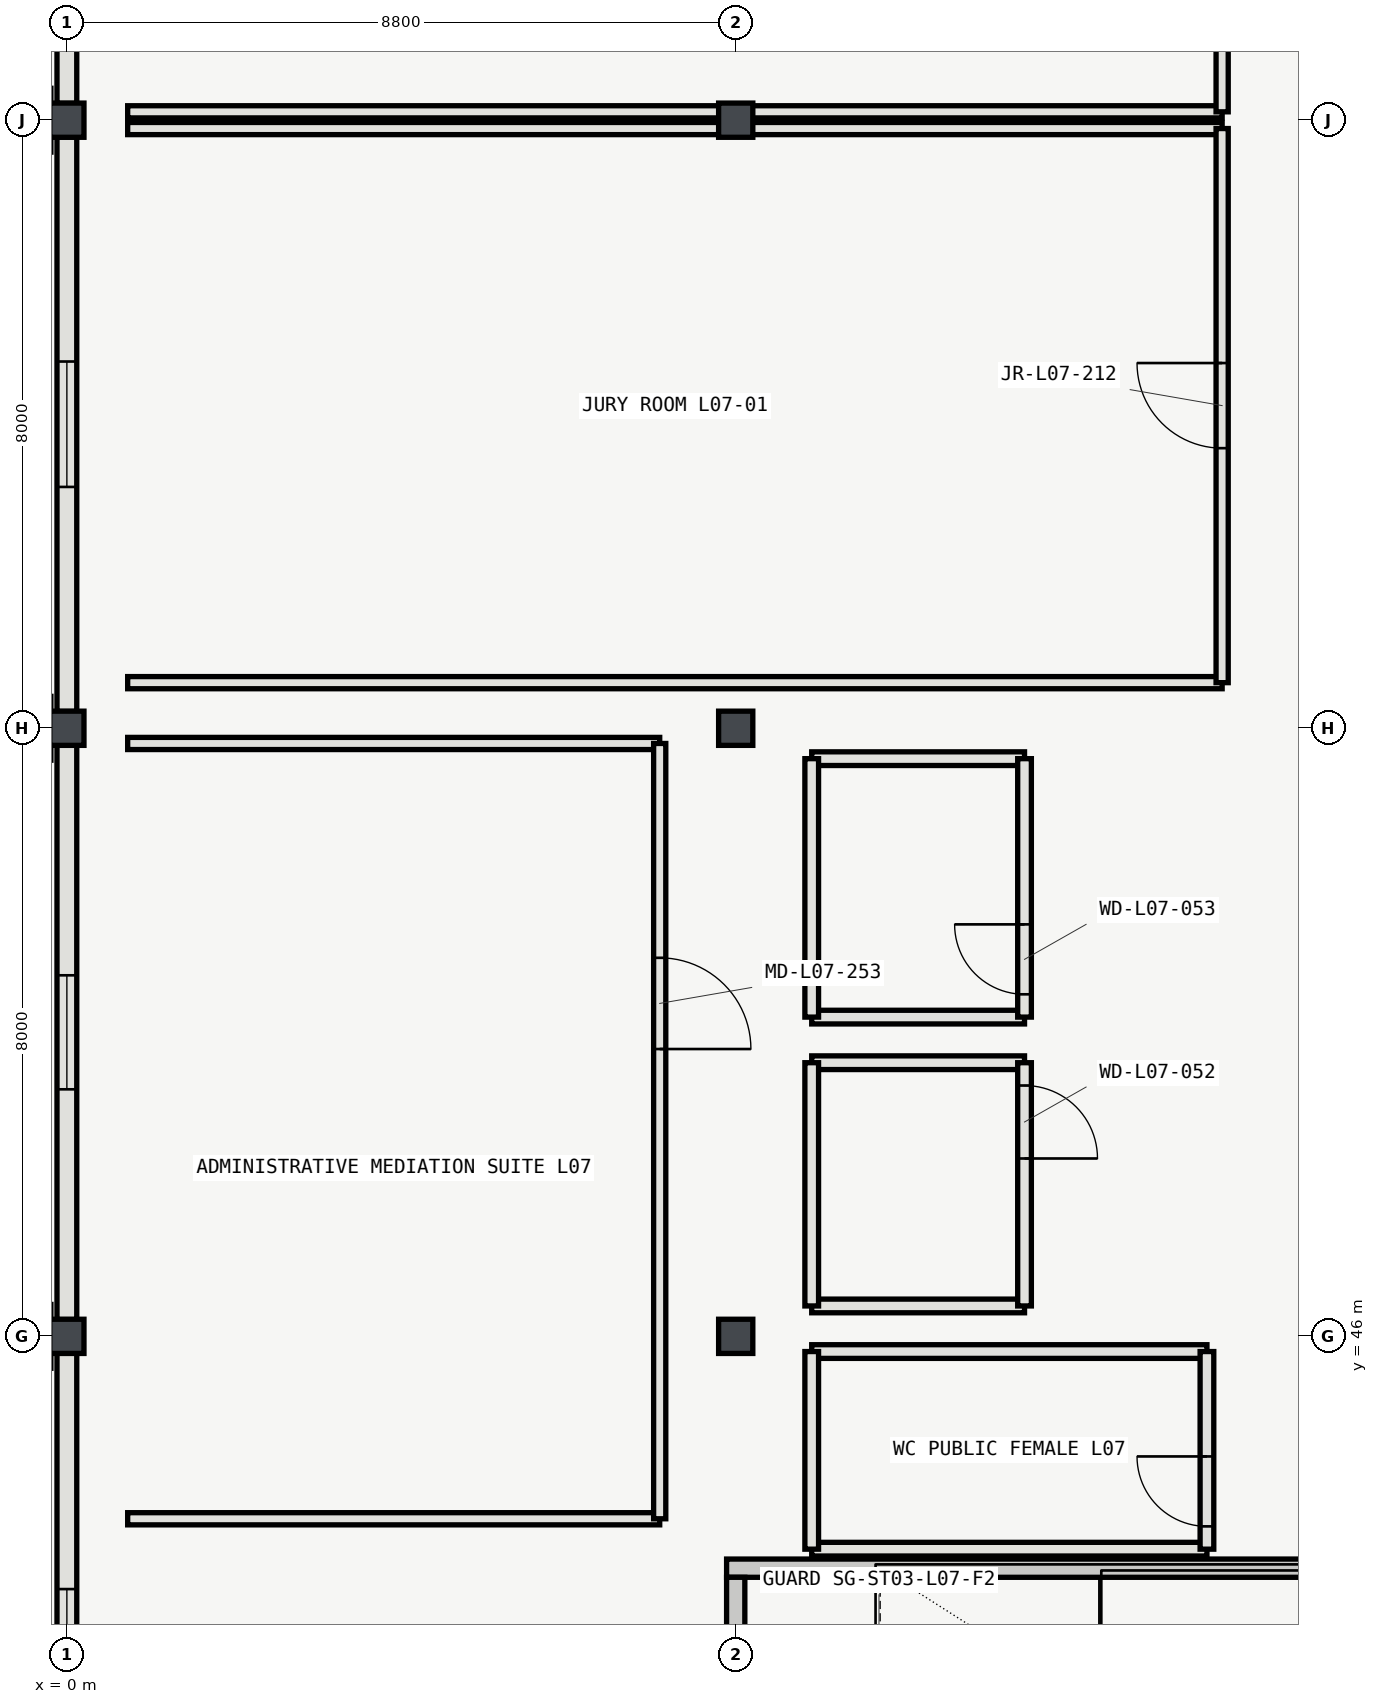
"""IFC4 building model, lengths in metres.
Left out: names, types, materials, properties, quantities, classifications, styles, units other than length and angle.
Written with IfcOpenShell. Run it as: python <this file> out.ifc"""

import sys

from ifc_helpers import new_model, si_unit, direction, frame, frame_2d, origin, origin_2d, place, context, subcontext, project, spatial, rectangle, hollow_rectangle, extrude, element, fill, save


model = new_model("IFC4")
c1 = context("Model", 3, precision=1e-05, world=origin(), true_north=direction((0.0, 1.0)))
c2 = subcontext(c1, "Body", "Model", "MODEL_VIEW")
j1 = project(units=[si_unit("LENGTHUNIT", "METRE"), si_unit("PLANEANGLEUNIT", "RADIAN")], contexts=[c1])
p1 = place(None, origin())
s1 = spatial("IfcSite", under=j1, at=p1, CompositionType="ELEMENT")
p2 = place(p1, origin())
s2 = spatial("IfcBuilding", under=s1, at=p2, CompositionType="ELEMENT")
p3 = place(p2, frame((0.0, 0.0, 33.0)))
s3 = spatial("IfcBuildingStorey", under=s2, at=p3, CompositionType="ELEMENT", Elevation=33.0)
for number, where, z_axis, x_axis in (
    (1, (0.0, 46.0, 0.0), (0.0, 0.0, 1.0), (1.0, 0.0, 0.0)),
    (2, (0.0, 54.0, 0.0), (0.0, 0.0, 1.0), (1.0, 0.0, 0.0)),
    (3, (0.0, 62.0, 0.0), (0.0, 0.0, 1.0), (1.0, 0.0, 0.0)),
    (4, (8.8, 46.0, 0.0), (0.0, 0.0, 1.0), (1.0, 0.0, 0.0)),
    (5, (8.8, 54.0, 0.0), (0.0, 0.0, 1.0), (1.0, 0.0, 0.0)),
    (6, (8.8, 62.0, 0.0), (0.0, 0.0, 1.0), (1.0, 0.0, 0.0)),
):
    element("IfcColumn", number, at=place(p3, frame(where, z_axis=z_axis, x_axis=x_axis)), inside=s3, PredefinedType="COLUMN", context=c2, shape_type="SweptSolid", body=[
        extrude(hollow_rectangle(XDim=0.45, YDim=0.45, WallThickness=0.018, InnerFilletRadius=0.018, OuterFilletRadius=0.036, at=origin_2d()), origin(), (0.0, 0.0, 1.0), 4.2),
    ])
p4 = place(p3, frame((0.0, 45.779, 0.0), z_axis=(0.0, 0.0, 1.0), x_axis=(0.0, -1.0, 0.0)))
e7 = element("IfcWall", 7, at=p4, inside=s3, PredefinedType="SOLIDWALL", context=c2, shape_type="SweptSolid", body=[
    extrude(rectangle(XDim=7.558, YDim=0.26, at=frame_2d((3.779, 0.0))), origin(), (0.0, 0.0, 1.0), 3.483),
])
p5 = place(p4, frame((3.104, 0.0, 0.95)))
e8 = element("IfcOpeningElement", 8, at=p5, cuts=e7, PredefinedType="OPENING", context=c2, shape_type="SweptSolid", body=[
    extrude(rectangle(XDim=1.35, YDim=2.1, at=frame_2d((0.675, 1.05))), frame((0.0, 0.14, 0.0), z_axis=(0.0, -1.0, 0.0), x_axis=(1.0, 0.0, 0.0)), (0.0, 0.0, 1.0), 0.28),
])
p6 = place(p3, frame((0.0, 53.779, 0.0), z_axis=(0.0, 0.0, 1.0), x_axis=(0.0, -1.0, 0.0)))
e9 = element("IfcWall", 9, at=p6, inside=s3, PredefinedType="SOLIDWALL", context=c2, shape_type="SweptSolid", body=[
    extrude(rectangle(XDim=7.558, YDim=0.26, at=frame_2d((3.779, 0.0))), origin(), (0.0, 0.0, 1.0), 3.483),
])
p7 = place(p6, frame((3.029, 0.0, 0.95)))
e10 = element("IfcOpeningElement", 10, at=p7, cuts=e9, PredefinedType="OPENING", context=c2, shape_type="SweptSolid", body=[
    extrude(rectangle(XDim=1.5, YDim=2.1, at=frame_2d((0.75, 1.05))), frame((0.0, 0.14, 0.0), z_axis=(0.0, -1.0, 0.0), x_axis=(1.0, 0.0, 0.0)), (0.0, 0.0, 1.0), 0.28),
])
p8 = place(p3, frame((0.0, 61.779, 0.0), z_axis=(0.0, 0.0, 1.0), x_axis=(0.0, -1.0, 0.0)))
e11 = element("IfcWall", 11, at=p8, inside=s3, PredefinedType="SOLIDWALL", context=c2, shape_type="SweptSolid", body=[
    extrude(rectangle(XDim=7.558, YDim=0.26, at=frame_2d((3.779, 0.0))), origin(), (0.0, 0.0, 1.0), 3.483),
])
p9 = place(p8, frame((2.954, 0.0, 0.95)))
e12 = element("IfcOpeningElement", 12, at=p9, cuts=e11, PredefinedType="OPENING", context=c2, shape_type="SweptSolid", body=[
    extrude(rectangle(XDim=1.65, YDim=2.1, at=frame_2d((0.825, 1.05))), frame((0.0, 0.14, 0.0), z_axis=(0.0, -1.0, 0.0), x_axis=(1.0, 0.0, 0.0)), (0.0, 0.0, 1.0), 0.28),
])
p10 = place(p3, frame((0.0, 69.779, 0.0), z_axis=(0.0, 0.0, 1.0), x_axis=(0.0, -1.0, 0.0)))
e13 = element("IfcWall", 13, at=p10, inside=s3, PredefinedType="SOLIDWALL", context=c2, shape_type="SweptSolid", body=[
    extrude(rectangle(XDim=7.558, YDim=0.26, at=frame_2d((3.779, 0.0))), origin(), (0.0, 0.0, 1.0), 3.483),
])
p11 = place(p10, frame((2.879, 0.0, 0.95)))
e14 = element("IfcOpeningElement", 14, at=p11, cuts=e13, PredefinedType="OPENING", context=c2, shape_type="SweptSolid", body=[
    extrude(rectangle(XDim=1.8, YDim=2.1, at=frame_2d((0.9, 1.05))), frame((0.0, 0.14, 0.0), z_axis=(0.0, -1.0, 0.0), x_axis=(1.0, 0.0, 0.0)), (0.0, 0.0, 1.0), 0.28),
])
for number, where, z_axis, x_axis in (
    (15, (9.8, 46.4, 0.0), (0.0, 0.0, 1.0), (1.0, 0.0, 0.0)),
    (16, (12.6, 49.6, 0.0), (0.0, 0.0, 1.0), (-1.0, 0.0, 0.0)),
):
    element("IfcWall", number, at=place(p3, frame(where, z_axis=z_axis, x_axis=x_axis)), inside=s3, PredefinedType="PLUMBINGWALL", context=c2, shape_type="SweptSolid", body=[
        extrude(rectangle(XDim=2.8, YDim=0.18, at=frame_2d((1.4, 0.0))), origin(), (0.0, 0.0, 1.0), 3.92),
    ])
p12 = place(p3, frame((9.8, 49.6, 0.0), z_axis=(0.0, 0.0, 1.0), x_axis=(0.0, -1.0, 0.0)))
e17 = element("IfcWall", 17, at=p12, inside=s3, PredefinedType="PLUMBINGWALL", context=c2, shape_type="SweptSolid", body=[
    extrude(rectangle(XDim=3.2, YDim=0.18, at=frame_2d((1.6, 0.0))), origin(), (0.0, 0.0, 1.0), 3.92),
])
p13 = place(p3, frame((12.6, 46.4, 0.0), z_axis=(0.0, 0.0, 1.0), x_axis=(0.0, 1.0, 0.0)))
e18 = element("IfcWall", 18, at=p13, inside=s3, PredefinedType="PLUMBINGWALL", context=c2, shape_type="SweptSolid", body=[
    extrude(rectangle(XDim=3.2, YDim=0.18, at=frame_2d((1.6, 0.0))), origin(), (0.0, 0.0, 1.0), 3.92),
])
p14 = place(p13, frame((1.94, 0.0, 0.0)))
e19 = element("IfcOpeningElement", 19, at=p14, cuts=e18, PredefinedType="OPENING", context=c2, shape_type="SweptSolid", body=[
    extrude(rectangle(XDim=0.96, YDim=2.1, at=frame_2d((0.48, 1.05))), frame((0.0, 0.1, 0.0), z_axis=(0.0, -1.0, 0.0), x_axis=(1.0, 0.0, 0.0)), (0.0, 0.0, 1.0), 0.2),
])
for number, where, z_axis, x_axis in (
    (20, (9.8, 50.2, 0.0), (0.0, 0.0, 1.0), (1.0, 0.0, 0.0)),
    (21, (12.6, 53.6, 0.0), (0.0, 0.0, 1.0), (-1.0, 0.0, 0.0)),
):
    element("IfcWall", number, at=place(p3, frame(where, z_axis=z_axis, x_axis=x_axis)), inside=s3, PredefinedType="PLUMBINGWALL", context=c2, shape_type="SweptSolid", body=[
        extrude(rectangle(XDim=2.8, YDim=0.18, at=frame_2d((1.4, 0.0))), origin(), (0.0, 0.0, 1.0), 3.92),
    ])
p15 = place(p3, frame((9.8, 53.6, 0.0), z_axis=(0.0, 0.0, 1.0), x_axis=(0.0, -1.0, 0.0)))
e22 = element("IfcWall", 22, at=p15, inside=s3, PredefinedType="PLUMBINGWALL", context=c2, shape_type="SweptSolid", body=[
    extrude(rectangle(XDim=3.4, YDim=0.18, at=frame_2d((1.7, 0.0))), origin(), (0.0, 0.0, 1.0), 3.92),
])
p16 = place(p3, frame((12.6, 50.2, 0.0), z_axis=(0.0, 0.0, 1.0), x_axis=(0.0, 1.0, 0.0)))
e23 = element("IfcWall", 23, at=p16, inside=s3, PredefinedType="PLUMBINGWALL", context=c2, shape_type="SweptSolid", body=[
    extrude(rectangle(XDim=3.4, YDim=0.18, at=frame_2d((1.7, 0.0))), origin(), (0.0, 0.0, 1.0), 3.92),
])
p17 = place(p16, frame((0.3, 0.0, 0.0)))
e24 = element("IfcOpeningElement", 24, at=p17, cuts=e23, PredefinedType="OPENING", context=c2, shape_type="SweptSolid", body=[
    extrude(rectangle(XDim=0.92, YDim=2.1, at=frame_2d((0.46, 1.05))), frame((0.0, 0.1, 0.0), z_axis=(0.0, -1.0, 0.0), x_axis=(1.0, 0.0, 0.0)), (0.0, 0.0, 1.0), 0.2),
])
p18 = place(p3, frame((9.8, 43.2, 0.0), z_axis=(0.0, 0.0, 1.0), x_axis=(1.0, 0.0, 0.0)))
e25 = element("IfcWall", 25, at=p18, inside=s3, PredefinedType="PLUMBINGWALL", context=c2, shape_type="SweptSolid", body=[
    extrude(rectangle(XDim=5.2, YDim=0.18, at=frame_2d((2.6, 0.0))), origin(), (0.0, 0.0, 1.0), 3.92),
])
p19 = place(p3, frame((15.0, 45.8, 0.0), z_axis=(0.0, 0.0, 1.0), x_axis=(-1.0, 0.0, 0.0)))
e26 = element("IfcWall", 26, at=p19, inside=s3, PredefinedType="PLUMBINGWALL", context=c2, shape_type="SweptSolid", body=[
    extrude(rectangle(XDim=5.2, YDim=0.18, at=frame_2d((2.6, 0.0))), origin(), (0.0, 0.0, 1.0), 3.636),
])
p20 = place(p3, frame((9.8, 45.8, 0.0), z_axis=(0.0, 0.0, 1.0), x_axis=(0.0, -1.0, 0.0)))
e27 = element("IfcWall", 27, at=p20, inside=s3, PredefinedType="PLUMBINGWALL", context=c2, shape_type="SweptSolid", body=[
    extrude(rectangle(XDim=2.6, YDim=0.18, at=frame_2d((1.3, 0.0))), origin(), (0.0, 0.0, 1.0), 3.92),
])
p21 = place(p3, frame((15.0, 43.2, 0.0), z_axis=(0.0, 0.0, 1.0), x_axis=(0.0, 1.0, 0.0)))
e28 = element("IfcWall", 28, at=p21, inside=s3, PredefinedType="PLUMBINGWALL", context=c2, shape_type="SweptSolid", body=[
    extrude(rectangle(XDim=2.6, YDim=0.18, at=frame_2d((1.3, 0.0))), origin(), (0.0, 0.0, 1.0), 3.92),
])
p22 = place(p21, frame((0.3, 0.0, 0.0)))
e29 = element("IfcOpeningElement", 29, at=p22, cuts=e28, PredefinedType="OPENING", context=c2, shape_type="SweptSolid", body=[
    extrude(rectangle(XDim=0.92, YDim=2.1, at=frame_2d((0.46, 1.05))), frame((0.0, 0.1, 0.0), z_axis=(0.0, -1.0, 0.0), x_axis=(1.0, 0.0, 0.0)), (0.0, 0.0, 1.0), 0.2),
])
p23 = place(p3, frame((0.8, 54.6, 0.0), z_axis=(0.0, 0.0, 1.0), x_axis=(1.0, 0.0, 0.0)))
e30 = element("IfcWall", 30, at=p23, inside=s3, PredefinedType="PARTITIONING", context=c2, shape_type="SweptSolid", body=[
    extrude(rectangle(XDim=14.4, YDim=0.16, at=frame_2d((7.2, 0.0))), origin(), (0.0, 0.0, 1.0), 3.92),
])
p24 = place(p3, frame((15.2, 61.89, 0.0), z_axis=(0.0, 0.0, 1.0), x_axis=(-1.0, 0.0, 0.0)))
e31 = element("IfcWall", 31, at=p24, inside=s3, PredefinedType="PARTITIONING", context=c2, shape_type="SweptSolid", body=[
    extrude(rectangle(XDim=14.4, YDim=0.16, at=frame_2d((7.2, 0.0))), origin(), (0.0, 0.0, 1.0), 3.636),
])
p25 = place(p3, frame((15.2, 54.6, 0.0), z_axis=(0.0, 0.0, 1.0), x_axis=(0.0, 1.0, 0.0)))
e32 = element("IfcWall", 32, at=p25, inside=s3, PredefinedType="PARTITIONING", context=c2, shape_type="SweptSolid", body=[
    extrude(rectangle(XDim=7.29, YDim=0.16, at=frame_2d((3.645, 0.0))), origin(), (0.0, 0.0, 1.0), 3.92),
])
p26 = place(p25, frame((3.085, 0.0, 0.0)))
e33 = element("IfcOpeningElement", 33, at=p26, cuts=e32, PredefinedType="OPENING", context=c2, shape_type="SweptSolid", body=[
    extrude(rectangle(XDim=1.12, YDim=2.2, at=frame_2d((0.56, 1.1))), frame((0.0, 0.09, 0.0), z_axis=(0.0, -1.0, 0.0), x_axis=(1.0, 0.0, 0.0)), (0.0, 0.0, 1.0), 0.18),
])
p27 = place(p3, frame((0.8, 62.11, 0.0), z_axis=(0.0, 0.0, 1.0), x_axis=(1.0, 0.0, 0.0)))
e34 = element("IfcWall", 34, at=p27, inside=s3, PredefinedType="PARTITIONING", context=c2, shape_type="SweptSolid", body=[
    extrude(rectangle(XDim=14.4, YDim=0.16, at=frame_2d((7.2, 0.0))), origin(), (0.0, 0.0, 1.0), 3.636),
])
p28 = place(p3, frame((15.2, 62.11, 0.0), z_axis=(0.0, 0.0, 1.0), x_axis=(0.0, 1.0, 0.0)))
e35 = element("IfcWall", 35, at=p28, inside=s3, PredefinedType="PARTITIONING", context=c2, shape_type="SweptSolid", body=[
    extrude(rectangle(XDim=7.29, YDim=0.16, at=frame_2d((3.645, 0.0))), origin(), (0.0, 0.0, 1.0), 3.92),
])
p29 = place(p28, frame((3.07, 0.0, 0.0)))
e36 = element("IfcOpeningElement", 36, at=p29, cuts=e35, PredefinedType="OPENING", context=c2, shape_type="SweptSolid", body=[
    extrude(rectangle(XDim=1.15, YDim=2.2, at=frame_2d((0.575, 1.1))), frame((0.0, 0.09, 0.0), z_axis=(0.0, -1.0, 0.0), x_axis=(1.0, 0.0, 0.0)), (0.0, 0.0, 1.0), 0.18),
])
p30 = place(p3, frame((0.8, 43.6, 0.0), z_axis=(0.0, 0.0, 1.0), x_axis=(1.0, 0.0, 0.0)))
e37 = element("IfcWall", 37, at=p30, inside=s3, PredefinedType="PARTITIONING", context=c2, shape_type="SweptSolid", body=[
    extrude(rectangle(XDim=7.0, YDim=0.16, at=frame_2d((3.5, 0.0))), origin(), (0.0, 0.0, 1.0), 3.92),
])
p31 = place(p3, frame((7.8, 53.8, 0.0), z_axis=(0.0, 0.0, 1.0), x_axis=(-1.0, 0.0, 0.0)))
e38 = element("IfcWall", 38, at=p31, inside=s3, PredefinedType="PARTITIONING", context=c2, shape_type="SweptSolid", body=[
    extrude(rectangle(XDim=7.0, YDim=0.16, at=frame_2d((3.5, 0.0))), origin(), (0.0, 0.0, 1.0), 3.486),
])
p32 = place(p3, frame((7.8, 43.6, 0.0), z_axis=(0.0, 0.0, 1.0), x_axis=(0.0, 1.0, 0.0)))
e39 = element("IfcWall", 39, at=p32, inside=s3, PredefinedType="PARTITIONING", context=c2, shape_type="SweptSolid", body=[
    extrude(rectangle(XDim=10.2, YDim=0.16, at=frame_2d((5.1, 0.0))), origin(), (0.0, 0.0, 1.0), 3.92),
])
p33 = place(p32, frame((6.18, 0.0, 0.0)))
e40 = element("IfcOpeningElement", 40, at=p33, cuts=e39, PredefinedType="OPENING", context=c2, shape_type="SweptSolid", body=[
    extrude(rectangle(XDim=1.2, YDim=2.2, at=frame_2d((0.6, 1.1))), frame((0.0, 0.09, 0.0), z_axis=(0.0, -1.0, 0.0), x_axis=(1.0, 0.0, 0.0)), (0.0, 0.0, 1.0), 0.18),
])
p34 = place(p3, frame((17.72, 42.95, 0.0), z_axis=(0.0, 0.0, 1.0), x_axis=(-1.0, 0.0, 0.0)))
e41 = element("IfcWall", 41, at=p34, inside=s3, PredefinedType="SHEAR", context=c2, shape_type="SweptSolid", body=[
    extrude(rectangle(XDim=9.04, YDim=0.24, at=frame_2d((4.52, 0.0))), origin(), (0.0, 0.0, 1.0), 3.95),
])
p35 = place(p3, frame((8.8, 38.67, 0.0), z_axis=(0.0, 0.0, 1.0), x_axis=(0.0, 1.0, 0.0)))
e42 = element("IfcWall", 42, at=p35, inside=s3, PredefinedType="SHEAR", context=c2, shape_type="SweptSolid", body=[
    extrude(rectangle(XDim=4.16, YDim=0.24, at=frame_2d((2.08, 0.0))), origin(), (0.0, 0.0, 1.0), 3.95),
])
p36 = place(p35, frame((1.405, 0.0, 0.0)))
e43 = element("IfcOpeningElement", 43, at=p36, cuts=e42, PredefinedType="OPENING", context=c2, shape_type="SweptSolid", body=[
    extrude(rectangle(XDim=1.35, YDim=2.2, at=frame_2d((0.675, 1.1))), frame((0.0, 0.13, 0.0), z_axis=(0.0, -1.0, 0.0), x_axis=(1.0, 0.0, 0.0)), (0.0, 0.0, 1.0), 0.26),
])
p37 = place(p5, origin())
e44 = element("IfcWindow", 44, at=p37, inside=s3, PartitioningType="SINGLE_PANEL", PredefinedType="WINDOW", context=c2, shape_type="SweptSolid", body=[
    extrude(rectangle(XDim=1.35, YDim=2.1, at=frame_2d((0.675, 1.05))), frame((0.0, 0.03, 0.0), z_axis=(0.0, -1.0, 0.0), x_axis=(1.0, 0.0, 0.0)), (0.0, 0.0, 1.0), 0.06),
])
fill(e8, e44)
p38 = place(p7, origin())
e45 = element("IfcWindow", 45, at=p38, inside=s3, PartitioningType="SINGLE_PANEL", PredefinedType="WINDOW", context=c2, shape_type="SweptSolid", body=[
    extrude(rectangle(XDim=1.5, YDim=2.1, at=frame_2d((0.75, 1.05))), frame((0.0, 0.03, 0.0), z_axis=(0.0, -1.0, 0.0), x_axis=(1.0, 0.0, 0.0)), (0.0, 0.0, 1.0), 0.06),
])
fill(e10, e45)
p39 = place(p9, origin())
e46 = element("IfcWindow", 46, at=p39, inside=s3, PartitioningType="SINGLE_PANEL", PredefinedType="WINDOW", context=c2, shape_type="SweptSolid", body=[
    extrude(rectangle(XDim=1.65, YDim=2.1, at=frame_2d((0.825, 1.05))), frame((0.0, 0.03, 0.0), z_axis=(0.0, -1.0, 0.0), x_axis=(1.0, 0.0, 0.0)), (0.0, 0.0, 1.0), 0.06),
])
fill(e12, e46)
p40 = place(p14, origin())
e47 = element("IfcDoor", 47, at=p40, inside=s3, OperationType="SINGLE_SWING_LEFT", PredefinedType="DOOR", context=c2, shape_type="SweptSolid", body=[
    extrude(rectangle(XDim=0.96, YDim=2.1, at=frame_2d((0.48, 1.05))), frame((0.0, 0.025, 0.0), z_axis=(0.0, -1.0, 0.0), x_axis=(1.0, 0.0, 0.0)), (0.0, 0.0, 1.0), 0.05),
])
fill(e19, e47)
p41 = place(p17, origin())
e48 = element("IfcDoor", 48, at=p41, inside=s3, OperationType="SINGLE_SWING_RIGHT", PredefinedType="DOOR", context=c2, shape_type="SweptSolid", body=[
    extrude(rectangle(XDim=0.92, YDim=2.1, at=frame_2d((0.46, 1.05))), frame((0.0, 0.025, 0.0), z_axis=(0.0, -1.0, 0.0), x_axis=(1.0, 0.0, 0.0)), (0.0, 0.0, 1.0), 0.05),
])
fill(e24, e48)
p42 = place(p22, origin())
e49 = element("IfcDoor", 49, at=p42, inside=s3, OperationType="SINGLE_SWING_RIGHT", PredefinedType="DOOR", context=c2, shape_type="SweptSolid", body=[
    extrude(rectangle(XDim=0.92, YDim=2.1, at=frame_2d((0.46, 1.05))), frame((0.0, 0.025, 0.0), z_axis=(0.0, -1.0, 0.0), x_axis=(1.0, 0.0, 0.0)), (0.0, 0.0, 1.0), 0.05),
])
fill(e29, e49)
p43 = place(p26, origin())
e50 = element("IfcDoor", 50, at=p43, inside=s3, OperationType="SINGLE_SWING_RIGHT", PredefinedType="DOOR", context=c2, shape_type="SweptSolid", body=[
    extrude(rectangle(XDim=1.12, YDim=2.2, at=frame_2d((0.56, 1.1))), frame((0.0, 0.025, 0.0), z_axis=(0.0, -1.0, 0.0), x_axis=(1.0, 0.0, 0.0)), (0.0, 0.0, 1.0), 0.05),
])
fill(e33, e50)
p44 = place(p33, origin())
e51 = element("IfcDoor", 51, at=p44, inside=s3, OperationType="SINGLE_SWING_LEFT", PredefinedType="DOOR", context=c2, shape_type="SweptSolid", body=[
    extrude(rectangle(XDim=1.2, YDim=2.2, at=frame_2d((0.6, 1.1))), frame((0.0, 0.025, 0.0), z_axis=(0.0, -1.0, 0.0), x_axis=(1.0, 0.0, 0.0)), (0.0, 0.0, 1.0), 0.05),
])
fill(e40, e51)
save(model, sys.argv[1])
